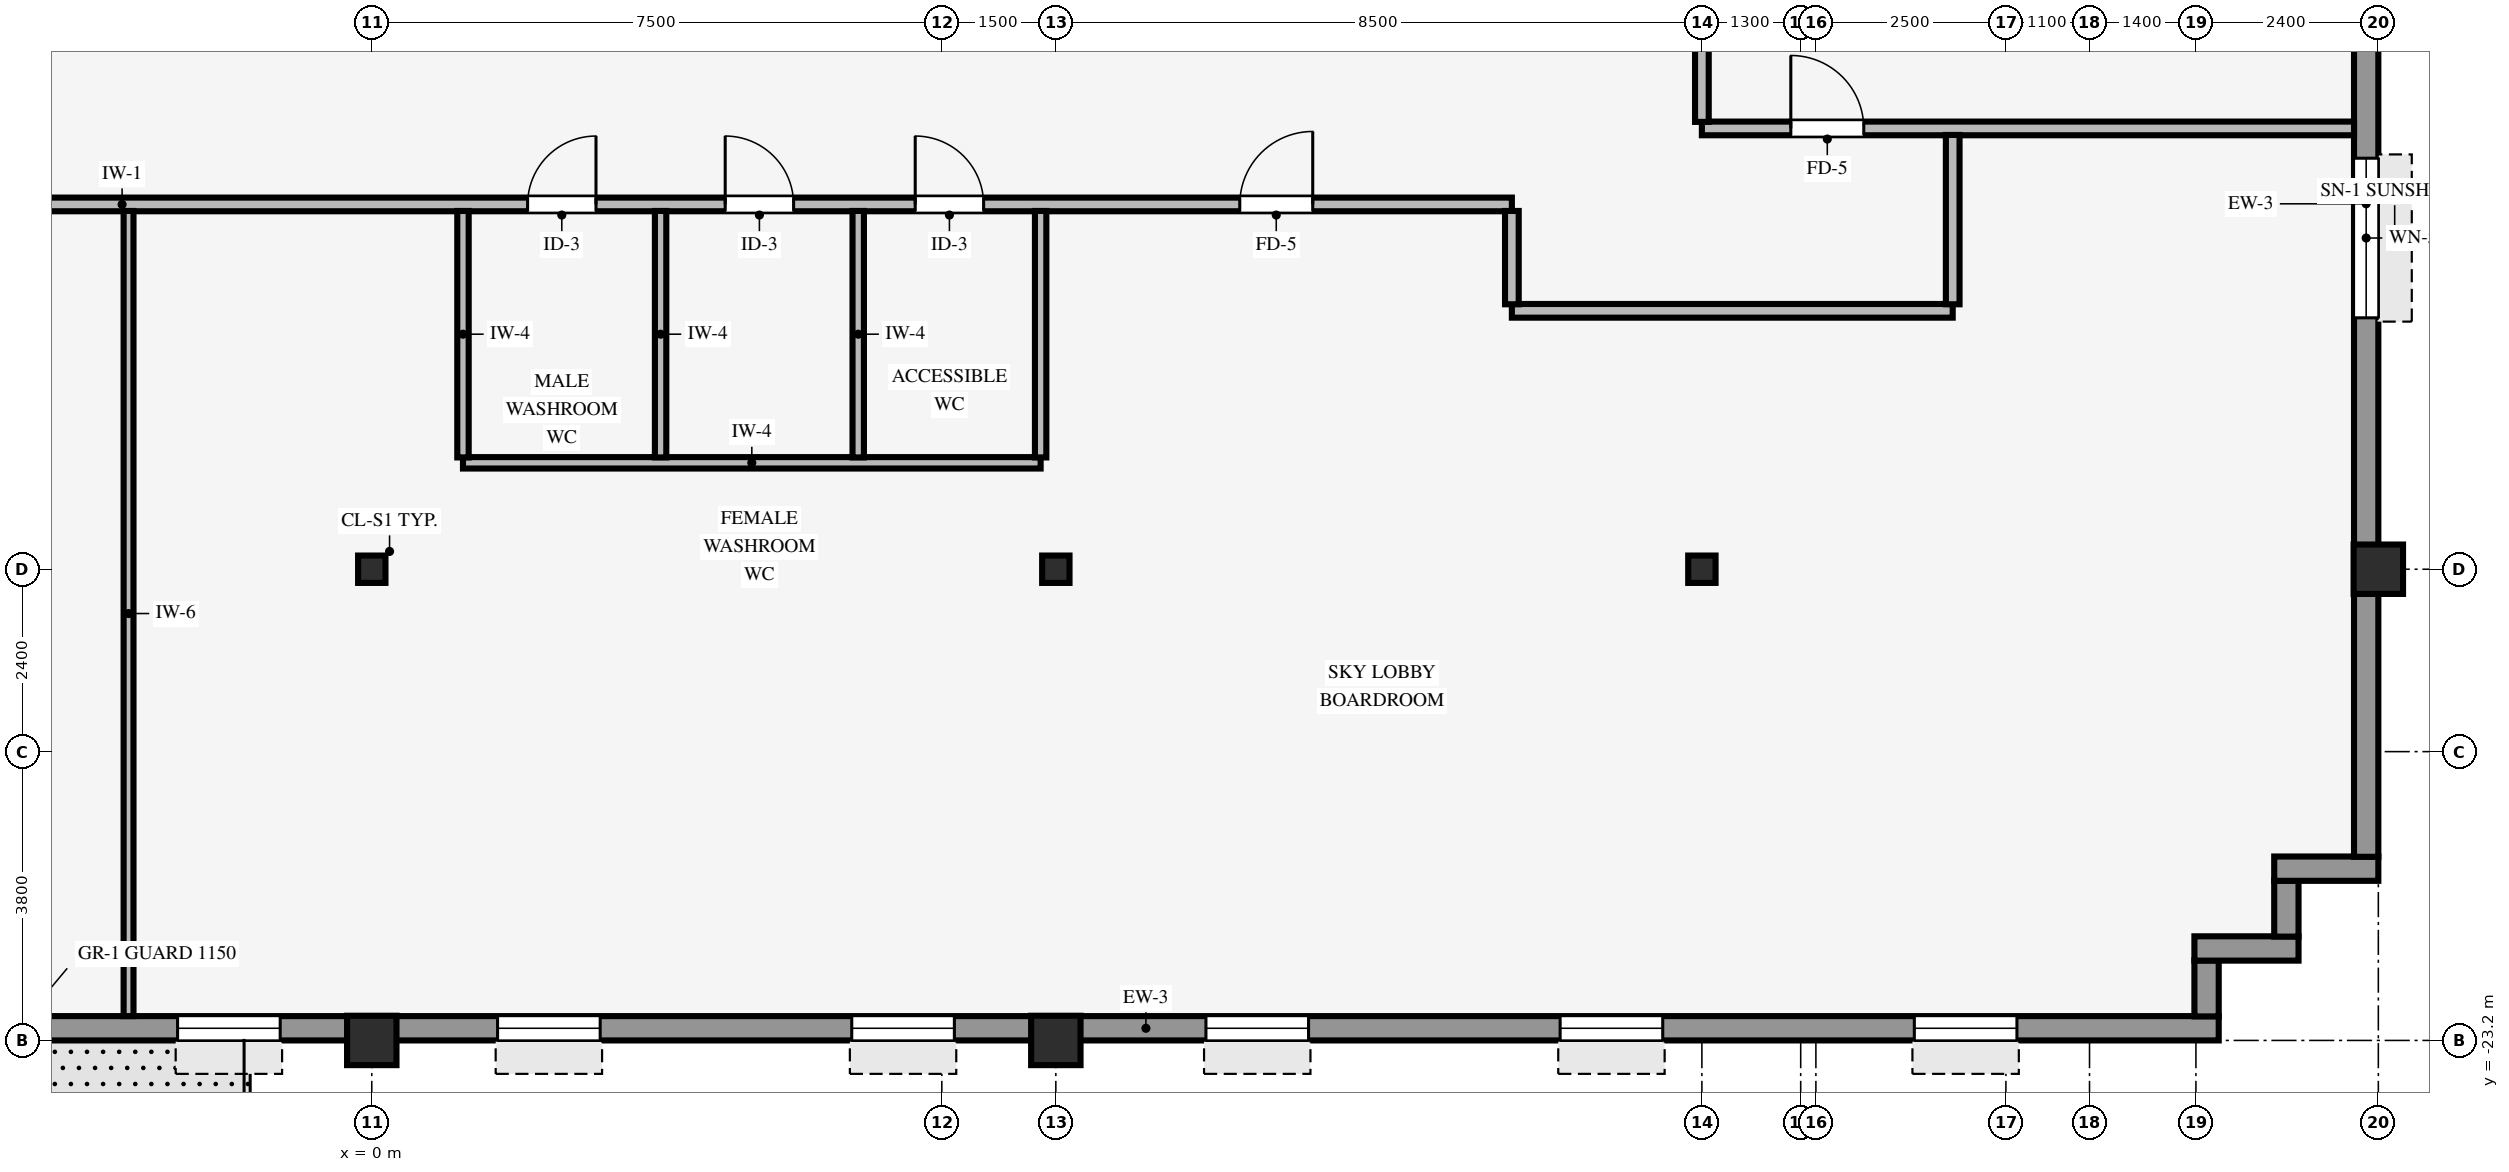
"""IFC4 building model, lengths in metres.
Left out: names, types, materials, properties, quantities, classifications, styles, units other than length and angle.
Written with IfcOpenShell. Run it as: python <this file> out.ifc"""

import sys

from ifc_helpers import new_model, si_unit, direction, frame, frame_2d, origin, origin_2d, place, context, subcontext, project, spatial, rectangle, hollow_rectangle, i_section, extrude, source, transform, mapped, element, fill, save


model = new_model("IFC4")
c1 = context("Model", 3, precision=1e-05, world=origin(), true_north=direction((0.0, 1.0)))
c2 = subcontext(c1, "Body", "Model", "MODEL_VIEW")
j1 = project(units=[si_unit("LENGTHUNIT", "METRE"), si_unit("PLANEANGLEUNIT", "RADIAN")], contexts=[c1])
p1 = place(None, origin())
s1 = spatial("IfcSite", under=j1, at=p1, CompositionType="ELEMENT")
p2 = place(p1, origin())
s2 = spatial("IfcBuilding", under=s1, at=p2, CompositionType="ELEMENT")
p3 = place(p2, frame((0.0, 0.0, 120.2)))
s3 = spatial("IfcBuildingStorey", under=s2, at=p3, CompositionType="ELEMENT", Elevation=120.2)
for number, where, z_axis, x_axis in (
    (1, (26.4, -17.0, 0.0), (0.0, 0.0, 1.0), (1.0, 0.0, 0.0)),
    (2, (0.0, -23.2, 0.0), (0.0, 0.0, 1.0), (1.0, 0.0, 0.0)),
    (3, (9.0, -23.2, 0.0), (0.0, 0.0, 1.0), (1.0, 0.0, 0.0)),
):
    element("IfcColumn", number, at=place(p3, frame(where, z_axis=z_axis, x_axis=x_axis)), inside=s3, PredefinedType="COLUMN", context=c2, shape_type="SweptSolid", body=[
        extrude(hollow_rectangle(XDim=0.65, YDim=0.65, WallThickness=0.04, InnerFilletRadius=0.04, OuterFilletRadius=0.08, at=origin_2d()), origin(), (0.0, 0.0, 1.0), 3.37),
    ])
for number, where, z_axis, x_axis in (
    (4, (0.0, -17.0, 0.0), (0.0, 0.0, 1.0), (1.0, 0.0, 0.0)),
    (5, (9.0, -17.0, 0.0), (0.0, 0.0, 1.0), (1.0, 0.0, 0.0)),
    (6, (17.5, -17.0, 0.0), (0.0, 0.0, 1.0), (1.0, 0.0, 0.0)),
):
    element("IfcColumn", number, at=place(p3, frame(where, z_axis=z_axis, x_axis=x_axis)), inside=s3, PredefinedType="COLUMN", context=c2, shape_type="SweptSolid", body=[
        extrude(i_section(OverallWidth=0.36, OverallDepth=0.36, WebThickness=0.021, FlangeThickness=0.021, FilletRadius=0.018, at=origin_2d()), origin(), (0.0, 0.0, 1.0), 3.37),
    ])
p4 = place(p3, frame((-24.3, -23.04, 0.0), z_axis=(0.0, 0.0, 1.0), x_axis=(1.0, 0.0, 0.0)))
e7 = element("IfcWall", 7, at=p4, inside=s3, PredefinedType="STANDARD", context=c2, shape_type="SweptSolid", body=[
    extrude(rectangle(XDim=48.6, YDim=0.32, at=frame_2d((24.3, 0.0))), origin(), (0.0, 0.0, 1.0), 2.705),
])
p5 = place(p4, frame((19.95, 0.0, 0.0), z_axis=(0.0, 0.0, 1.0), x_axis=(-1.0, 0.0, 0.0)))
e8 = element("IfcOpeningElement", 8, at=p5, cuts=e7, PredefinedType="OPENING", context=c2, shape_type="SweptSolid", body=[
    extrude(rectangle(XDim=1.05, YDim=2.1, at=frame_2d((0.525, 1.05))), frame((0.0, 0.17, 0.0), z_axis=(0.0, -1.0, 0.0), x_axis=(1.0, 0.0, 0.0)), (0.0, 0.0, 1.0), 0.34),
])
p6 = place(p4, frame((2.655, 0.0, 0.8)))
e9 = element("IfcOpeningElement", 9, at=p6, cuts=e7, PredefinedType="OPENING", context=c2, shape_type="SweptSolid", body=[
    extrude(rectangle(XDim=1.35, YDim=1.56, at=frame_2d((0.675, 0.78))), frame((0.0, 0.17, 0.0), z_axis=(0.0, -1.0, 0.0), x_axis=(1.0, 0.0, 0.0)), (0.0, 0.0, 1.0), 0.34),
])
p7 = place(p4, frame((7.315, 0.0, 0.8)))
e10 = element("IfcOpeningElement", 10, at=p7, cuts=e7, PredefinedType="OPENING", context=c2, shape_type="SweptSolid", body=[
    extrude(rectangle(XDim=1.35, YDim=1.56, at=frame_2d((0.675, 0.78))), frame((0.0, 0.17, 0.0), z_axis=(0.0, -1.0, 0.0), x_axis=(1.0, 0.0, 0.0)), (0.0, 0.0, 1.0), 0.34),
])
p8 = place(p4, frame((11.975, 0.0, 0.8)))
e11 = element("IfcOpeningElement", 11, at=p8, cuts=e7, PredefinedType="OPENING", context=c2, shape_type="SweptSolid", body=[
    extrude(rectangle(XDim=1.35, YDim=1.56, at=frame_2d((0.675, 0.78))), frame((0.0, 0.17, 0.0), z_axis=(0.0, -1.0, 0.0), x_axis=(1.0, 0.0, 0.0)), (0.0, 0.0, 1.0), 0.34),
])
p9 = place(p4, frame((16.635, 0.0, 0.8)))
e12 = element("IfcOpeningElement", 12, at=p9, cuts=e7, PredefinedType="OPENING", context=c2, shape_type="SweptSolid", body=[
    extrude(rectangle(XDim=1.35, YDim=1.56, at=frame_2d((0.675, 0.78))), frame((0.0, 0.17, 0.0), z_axis=(0.0, -1.0, 0.0), x_axis=(1.0, 0.0, 0.0)), (0.0, 0.0, 1.0), 0.34),
])
p10 = place(p4, frame((21.745, 0.0, 0.8)))
e13 = element("IfcOpeningElement", 13, at=p10, cuts=e7, PredefinedType="OPENING", context=c2, shape_type="SweptSolid", body=[
    extrude(rectangle(XDim=1.35, YDim=1.56, at=frame_2d((0.675, 0.78))), frame((0.0, 0.17, 0.0), z_axis=(0.0, -1.0, 0.0), x_axis=(1.0, 0.0, 0.0)), (0.0, 0.0, 1.0), 0.34),
])
p11 = place(p4, frame((25.955, 0.0, 0.8)))
e14 = element("IfcOpeningElement", 14, at=p11, cuts=e7, PredefinedType="OPENING", context=c2, shape_type="SweptSolid", body=[
    extrude(rectangle(XDim=1.35, YDim=1.56, at=frame_2d((0.675, 0.78))), frame((0.0, 0.17, 0.0), z_axis=(0.0, -1.0, 0.0), x_axis=(1.0, 0.0, 0.0)), (0.0, 0.0, 1.0), 0.34),
])
p12 = place(p4, frame((30.615, 0.0, 0.8)))
e15 = element("IfcOpeningElement", 15, at=p12, cuts=e7, PredefinedType="OPENING", context=c2, shape_type="SweptSolid", body=[
    extrude(rectangle(XDim=1.35, YDim=1.56, at=frame_2d((0.675, 0.78))), frame((0.0, 0.17, 0.0), z_axis=(0.0, -1.0, 0.0), x_axis=(1.0, 0.0, 0.0)), (0.0, 0.0, 1.0), 0.34),
])
p13 = place(p4, frame((35.275, 0.0, 0.8)))
e16 = element("IfcOpeningElement", 16, at=p13, cuts=e7, PredefinedType="OPENING", context=c2, shape_type="SweptSolid", body=[
    extrude(rectangle(XDim=1.35, YDim=1.56, at=frame_2d((0.675, 0.78))), frame((0.0, 0.17, 0.0), z_axis=(0.0, -1.0, 0.0), x_axis=(1.0, 0.0, 0.0)), (0.0, 0.0, 1.0), 0.34),
])
p14 = place(p4, frame((39.935, 0.0, 0.8)))
e17 = element("IfcOpeningElement", 17, at=p14, cuts=e7, PredefinedType="OPENING", context=c2, shape_type="SweptSolid", body=[
    extrude(rectangle(XDim=1.35, YDim=1.56, at=frame_2d((0.675, 0.78))), frame((0.0, 0.17, 0.0), z_axis=(0.0, -1.0, 0.0), x_axis=(1.0, 0.0, 0.0)), (0.0, 0.0, 1.0), 0.34),
])
p15 = place(p4, frame((44.595, 0.0, 0.8)))
e18 = element("IfcOpeningElement", 18, at=p15, cuts=e7, PredefinedType="OPENING", context=c2, shape_type="SweptSolid", body=[
    extrude(rectangle(XDim=1.35, YDim=1.56, at=frame_2d((0.675, 0.78))), frame((0.0, 0.17, 0.0), z_axis=(0.0, -1.0, 0.0), x_axis=(1.0, 0.0, 0.0)), (0.0, 0.0, 1.0), 0.34),
])
p16 = place(p3, frame((24.14, -22.884, 0.0), z_axis=(0.0, 0.0, 1.0), x_axis=(0.0, 1.0, 0.0)))
e19 = element("IfcWall", 19, at=p16, inside=s3, PredefinedType="STANDARD", context=c2, shape_type="SweptSolid", body=[
    extrude(rectangle(XDim=0.738, YDim=0.32, at=frame_2d((0.369, 0.0))), origin(), (0.0, 0.0, 1.0), 3.36),
])
p17 = place(p3, frame((23.98, -21.99, 0.0), z_axis=(0.0, 0.0, 1.0), x_axis=(1.0, 0.0, 0.0)))
e20 = element("IfcWall", 20, at=p17, inside=s3, PredefinedType="STANDARD", context=c2, shape_type="SweptSolid", body=[
    extrude(rectangle(XDim=1.37, YDim=0.32, at=frame_2d((0.685, 0.0))), origin(), (0.0, 0.0, 1.0), 3.36),
])
p18 = place(p3, frame((25.19, -21.834, 0.0), z_axis=(0.0, 0.0, 1.0), x_axis=(0.0, 1.0, 0.0)))
e21 = element("IfcWall", 21, at=p18, inside=s3, PredefinedType="STANDARD", context=c2, shape_type="SweptSolid", body=[
    extrude(rectangle(XDim=0.738, YDim=0.32, at=frame_2d((0.369, 0.0))), origin(), (0.0, 0.0, 1.0), 3.36),
])
p19 = place(p3, frame((25.03, -20.94, 0.0), z_axis=(0.0, 0.0, 1.0), x_axis=(1.0, 0.0, 0.0)))
e22 = element("IfcWall", 22, at=p19, inside=s3, PredefinedType="STANDARD", context=c2, shape_type="SweptSolid", body=[
    extrude(rectangle(XDim=1.37, YDim=0.32, at=frame_2d((0.685, 0.0))), origin(), (0.0, 0.0, 1.0), 3.36),
])
p20 = place(p3, frame((26.24, -20.784, 0.0), z_axis=(0.0, 0.0, 1.0), x_axis=(0.0, 1.0, 0.0)))
e23 = element("IfcWall", 23, at=p20, inside=s3, PredefinedType="STANDARD", context=c2, shape_type="SweptSolid", body=[
    extrude(rectangle(XDim=17.184, YDim=0.32, at=frame_2d((8.592, 0.0))), origin(), (0.0, 0.0, 1.0), 2.705),
])
p21 = place(p20, frame((7.092, 0.0, 0.8)))
e24 = element("IfcOpeningElement", 24, at=p21, cuts=e23, PredefinedType="OPENING", context=c2, shape_type="SweptSolid", body=[
    extrude(rectangle(XDim=2.1, YDim=1.56, at=frame_2d((1.05, 0.78))), frame((0.0, 0.17, 0.0), z_axis=(0.0, -1.0, 0.0), x_axis=(1.0, 0.0, 0.0)), (0.0, 0.0, 1.0), 0.34),
])
p22 = place(p20, frame((12.603, 0.0, 0.8)))
e25 = element("IfcOpeningElement", 25, at=p22, cuts=e23, PredefinedType="OPENING", context=c2, shape_type="SweptSolid", body=[
    extrude(rectangle(XDim=2.1, YDim=1.56, at=frame_2d((1.05, 0.78))), frame((0.0, 0.17, 0.0), z_axis=(0.0, -1.0, 0.0), x_axis=(1.0, 0.0, 0.0)), (0.0, 0.0, 1.0), 0.34),
])
p23 = place(p3, frame((1.2, -15.6, 0.0), z_axis=(0.0, 0.0, 1.0), x_axis=(1.0, 0.0, 0.0)))
e26 = element("IfcWall", 26, at=p23, inside=s3, PredefinedType="PARTITIONING", context=c2, shape_type="SweptSolid", body=[
    extrude(rectangle(XDim=7.6, YDim=0.15, at=frame_2d((3.8, 0.0))), origin(), (0.0, 0.0, 1.0), 3.36),
])
p24 = place(p3, frame((15.0, -13.6, 0.0), z_axis=(0.0, 0.0, 1.0), x_axis=(1.0, 0.0, 0.0)))
e27 = element("IfcWall", 27, at=p24, inside=s3, PredefinedType="PARTITIONING", context=c2, shape_type="SweptSolid", body=[
    extrude(rectangle(XDim=5.8, YDim=0.18, at=frame_2d((2.9, 0.0))), origin(), (0.0, 0.0, 1.0), 2.998),
])
p25 = place(p3, frame((-15.0, -12.2, 0.0), z_axis=(0.0, 0.0, 1.0), x_axis=(1.0, 0.0, 0.0)))
e28 = element("IfcWall", 28, at=p25, inside=s3, PredefinedType="PARTITIONING", context=c2, shape_type="SweptSolid", body=[
    extrude(rectangle(XDim=30.0, YDim=0.18, at=frame_2d((15.0, 0.0))), origin(), (0.0, 0.0, 1.0), 3.36),
])
p26 = place(p25, frame((5.42, 0.0, 0.0)))
e29 = element("IfcOpeningElement", 29, at=p26, cuts=e28, PredefinedType="OPENING", context=c2, shape_type="SweptSolid", body=[
    extrude(rectangle(XDim=0.96, YDim=2.1, at=frame_2d((0.48, 1.05))), frame((0.0, 0.1, 0.0), z_axis=(0.0, -1.0, 0.0), x_axis=(1.0, 0.0, 0.0)), (0.0, 0.0, 1.0), 0.2),
])
p27 = place(p25, frame((26.42, 0.0, 0.0)))
e30 = element("IfcOpeningElement", 30, at=p27, cuts=e28, PredefinedType="OPENING", context=c2, shape_type="SweptSolid", body=[
    extrude(rectangle(XDim=0.96, YDim=2.1, at=frame_2d((0.48, 1.05))), frame((0.0, 0.1, 0.0), z_axis=(0.0, -1.0, 0.0), x_axis=(1.0, 0.0, 0.0)), (0.0, 0.0, 1.0), 0.2),
])
p28 = place(p25, frame((19.65, 0.0, 0.0)))
e31 = element("IfcOpeningElement", 31, at=p28, cuts=e28, PredefinedType="OPENING", context=c2, shape_type="SweptSolid", body=[
    extrude(rectangle(XDim=0.9, YDim=2.1, at=frame_2d((0.45, 1.05))), frame((0.0, 0.1, 0.0), z_axis=(0.0, -1.0, 0.0), x_axis=(1.0, 0.0, 0.0)), (0.0, 0.0, 1.0), 0.2),
])
p29 = place(p25, frame((17.05, 0.0, 0.0)))
e32 = element("IfcOpeningElement", 32, at=p29, cuts=e28, PredefinedType="OPENING", context=c2, shape_type="SweptSolid", body=[
    extrude(rectangle(XDim=0.9, YDim=2.1, at=frame_2d((0.45, 1.05))), frame((0.0, 0.1, 0.0), z_axis=(0.0, -1.0, 0.0), x_axis=(1.0, 0.0, 0.0)), (0.0, 0.0, 1.0), 0.2),
])
p30 = place(p25, frame((22.15, 0.0, 0.0)))
e33 = element("IfcOpeningElement", 33, at=p30, cuts=e28, PredefinedType="OPENING", context=c2, shape_type="SweptSolid", body=[
    extrude(rectangle(XDim=0.9, YDim=2.1, at=frame_2d((0.45, 1.05))), frame((0.0, 0.1, 0.0), z_axis=(0.0, -1.0, 0.0), x_axis=(1.0, 0.0, 0.0)), (0.0, 0.0, 1.0), 0.2),
])
p31 = place(p3, frame((17.5, -11.2, 0.0), z_axis=(0.0, 0.0, 1.0), x_axis=(1.0, 0.0, 0.0)))
e34 = element("IfcWall", 34, at=p31, inside=s3, PredefinedType="PARTITIONING", context=c2, shape_type="SweptSolid", body=[
    extrude(rectangle(XDim=8.58, YDim=0.18, at=frame_2d((4.29, 0.0))), origin(), (0.0, 0.0, 1.0), 3.36),
])
p32 = place(p31, frame((1.17, 0.0, 0.0)))
e35 = element("IfcOpeningElement", 35, at=p32, cuts=e34, PredefinedType="OPENING", context=c2, shape_type="SweptSolid", body=[
    extrude(rectangle(XDim=0.96, YDim=2.1, at=frame_2d((0.48, 1.05))), frame((0.0, 0.1, 0.0), z_axis=(0.0, -1.0, 0.0), x_axis=(1.0, 0.0, 0.0)), (0.0, 0.0, 1.0), 0.2),
])
p33 = place(p3, frame((-3.2, -22.88, 0.0), z_axis=(0.0, 0.0, 1.0), x_axis=(0.0, 1.0, 0.0)))
e36 = element("IfcWall", 36, at=p33, inside=s3, PredefinedType="PARTITIONING", context=c2, shape_type="SweptSolid", body=[
    extrude(rectangle(XDim=10.594, YDim=0.13, at=frame_2d((5.297, 0.0))), origin(), (0.0, 0.0, 1.0), 3.36),
])
for number, where, z_axis, x_axis in (
    (37, (1.2, -15.529, 0.0), (0.0, 0.0, 1.0), (0.0, 1.0, 0.0)),
    (38, (3.8, -15.529, 0.0), (0.0, 0.0, 1.0), (0.0, 1.0, 0.0)),
    (39, (6.4, -15.529, 0.0), (0.0, 0.0, 1.0), (0.0, 1.0, 0.0)),
):
    element("IfcWall", number, at=place(p3, frame(where, z_axis=z_axis, x_axis=x_axis)), inside=s3, PredefinedType="PARTITIONING", context=c2, shape_type="SweptSolid", body=[
        extrude(rectangle(XDim=3.243, YDim=0.15, at=frame_2d((1.622, 0.0))), origin(), (0.0, 0.0, 1.0), 3.36),
    ])
p34 = place(p3, frame((8.8, -15.529, 0.0), z_axis=(0.0, 0.0, 1.0), x_axis=(0.0, 1.0, 0.0)))
e40 = element("IfcWall", 40, at=p34, inside=s3, PredefinedType="PARTITIONING", context=c2, shape_type="SweptSolid", body=[
    extrude(rectangle(XDim=3.243, YDim=0.15, at=frame_2d((1.622, 0.0))), origin(), (0.0, 0.0, 1.0), 2.816),
])
p35 = place(p3, frame((15.0, -13.514, 0.0), z_axis=(0.0, 0.0, 1.0), x_axis=(0.0, 1.0, 0.0)))
e41 = element("IfcWall", 41, at=p35, inside=s3, PredefinedType="PARTITIONING", context=c2, shape_type="SweptSolid", body=[
    extrude(rectangle(XDim=1.228, YDim=0.18, at=frame_2d((0.614, 0.0))), origin(), (0.0, 0.0, 1.0), 3.36),
])
p36 = place(p3, frame((17.5, -11.114, 0.0), z_axis=(0.0, 0.0, 1.0), x_axis=(0.0, 1.0, 0.0)))
e42 = element("IfcWall", 42, at=p36, inside=s3, PredefinedType="PARTITIONING", context=c2, shape_type="SweptSolid", body=[
    extrude(rectangle(XDim=0.968, YDim=0.18, at=frame_2d((0.484, 0.0))), origin(), (0.0, 0.0, 1.0), 2.816),
])
p37 = place(p3, frame((20.8, -13.514, 0.0), z_axis=(0.0, 0.0, 1.0), x_axis=(0.0, 1.0, 0.0)))
e43 = element("IfcWall", 43, at=p37, inside=s3, PredefinedType="PARTITIONING", context=c2, shape_type="SweptSolid", body=[
    extrude(rectangle(XDim=2.228, YDim=0.18, at=frame_2d((1.114, 0.0))), origin(), (0.0, 0.0, 1.0), 3.36),
])
m1 = source(origin(), c2, "Body", "SweptSolid", [
    extrude(rectangle(XDim=1.35, YDim=1.56, at=frame_2d((0.675, 0.78))), frame((0.0, 0.03, 0.0), z_axis=(0.0, -1.0, 0.0), x_axis=(1.0, 0.0, 0.0)), (0.0, 0.0, 1.0), 0.06),
])
p38 = place(p10, origin())
e44 = element("IfcWindow", 44, at=p38, inside=s3, PartitioningType="SINGLE_PANEL", PredefinedType="WINDOW", context=c2, shape_type="MappedRepresentation", body=[
    mapped(m1, transform((0.0, 0.0, 0.0), scale=1.0)),
])
fill(e13, e44)
p39 = place(p11, origin())
e45 = element("IfcWindow", 45, at=p39, inside=s3, PartitioningType="SINGLE_PANEL", PredefinedType="WINDOW", context=c2, shape_type="MappedRepresentation", body=[
    mapped(m1, transform((0.0, 0.0, 0.0), scale=1.0)),
])
fill(e14, e45)
p40 = place(p12, origin())
e46 = element("IfcWindow", 46, at=p40, inside=s3, PartitioningType="SINGLE_PANEL", PredefinedType="WINDOW", context=c2, shape_type="MappedRepresentation", body=[
    mapped(m1, transform((0.0, 0.0, 0.0), scale=1.0)),
])
fill(e15, e46)
p41 = place(p13, origin())
e47 = element("IfcWindow", 47, at=p41, inside=s3, PartitioningType="SINGLE_PANEL", PredefinedType="WINDOW", context=c2, shape_type="MappedRepresentation", body=[
    mapped(m1, transform((0.0, 0.0, 0.0), scale=1.0)),
])
fill(e16, e47)
p42 = place(p14, origin())
e48 = element("IfcWindow", 48, at=p42, inside=s3, PartitioningType="SINGLE_PANEL", PredefinedType="WINDOW", context=c2, shape_type="MappedRepresentation", body=[
    mapped(m1, transform((0.0, 0.0, 0.0), scale=1.0)),
])
fill(e17, e48)
p43 = place(p15, origin())
e49 = element("IfcWindow", 49, at=p43, inside=s3, PartitioningType="SINGLE_PANEL", PredefinedType="WINDOW", context=c2, shape_type="MappedRepresentation", body=[
    mapped(m1, transform((0.0, 0.0, 0.0), scale=1.0)),
])
fill(e18, e49)
m2 = source(origin(), c2, "Body", "SweptSolid", [
    extrude(rectangle(XDim=2.1, YDim=1.56, at=frame_2d((1.05, 0.78))), frame((0.0, 0.03, 0.0), z_axis=(0.0, -1.0, 0.0), x_axis=(1.0, 0.0, 0.0)), (0.0, 0.0, 1.0), 0.06),
])
p44 = place(p21, origin())
e50 = element("IfcWindow", 50, at=p44, inside=s3, PartitioningType="SINGLE_PANEL", PredefinedType="WINDOW", context=c2, shape_type="MappedRepresentation", body=[
    mapped(m2, transform((0.0, 0.0, 0.0), scale=1.0)),
])
fill(e24, e50)
m3 = source(origin(), c2, "Body", "SweptSolid", [
    extrude(rectangle(XDim=0.96, YDim=2.1, at=frame_2d((0.48, 1.05))), frame((0.0, 0.025, 0.0), z_axis=(0.0, -1.0, 0.0), x_axis=(1.0, 0.0, 0.0)), (0.0, 0.0, 1.0), 0.05),
])
p45 = place(p27, origin())
e51 = element("IfcDoor", 51, at=p45, inside=s3, OperationType="SINGLE_SWING_RIGHT", PredefinedType="DOOR", context=c2, shape_type="MappedRepresentation", body=[
    mapped(m3, transform((0.0, 0.0, 0.0), scale=1.0)),
])
fill(e30, e51)
p46 = place(p32, origin())
e52 = element("IfcDoor", 52, at=p46, inside=s3, OperationType="SINGLE_SWING_LEFT", PredefinedType="DOOR", context=c2, shape_type="MappedRepresentation", body=[
    mapped(m3, transform((0.0, 0.0, 0.0), scale=1.0)),
])
fill(e35, e52)
m4 = source(origin(), c2, "Body", "SweptSolid", [
    extrude(rectangle(XDim=0.9, YDim=2.1, at=frame_2d((0.45, 1.05))), frame((0.0, 0.025, 0.0), z_axis=(0.0, -1.0, 0.0), x_axis=(1.0, 0.0, 0.0)), (0.0, 0.0, 1.0), 0.05),
])
p47 = place(p28, origin())
e53 = element("IfcDoor", 53, at=p47, inside=s3, OperationType="SINGLE_SWING_LEFT", PredefinedType="DOOR", context=c2, shape_type="MappedRepresentation", body=[
    mapped(m4, transform((0.0, 0.0, 0.0), scale=1.0)),
])
fill(e31, e53)
p48 = place(p29, origin())
e54 = element("IfcDoor", 54, at=p48, inside=s3, OperationType="SINGLE_SWING_RIGHT", PredefinedType="DOOR", context=c2, shape_type="MappedRepresentation", body=[
    mapped(m4, transform((0.0, 0.0, 0.0), scale=1.0)),
])
fill(e32, e54)
p49 = place(p30, origin())
e55 = element("IfcDoor", 55, at=p49, inside=s3, OperationType="SINGLE_SWING_LEFT", PredefinedType="DOOR", context=c2, shape_type="MappedRepresentation", body=[
    mapped(m4, transform((0.0, 0.0, 0.0), scale=1.0)),
])
fill(e33, e55)
save(model, sys.argv[1])
